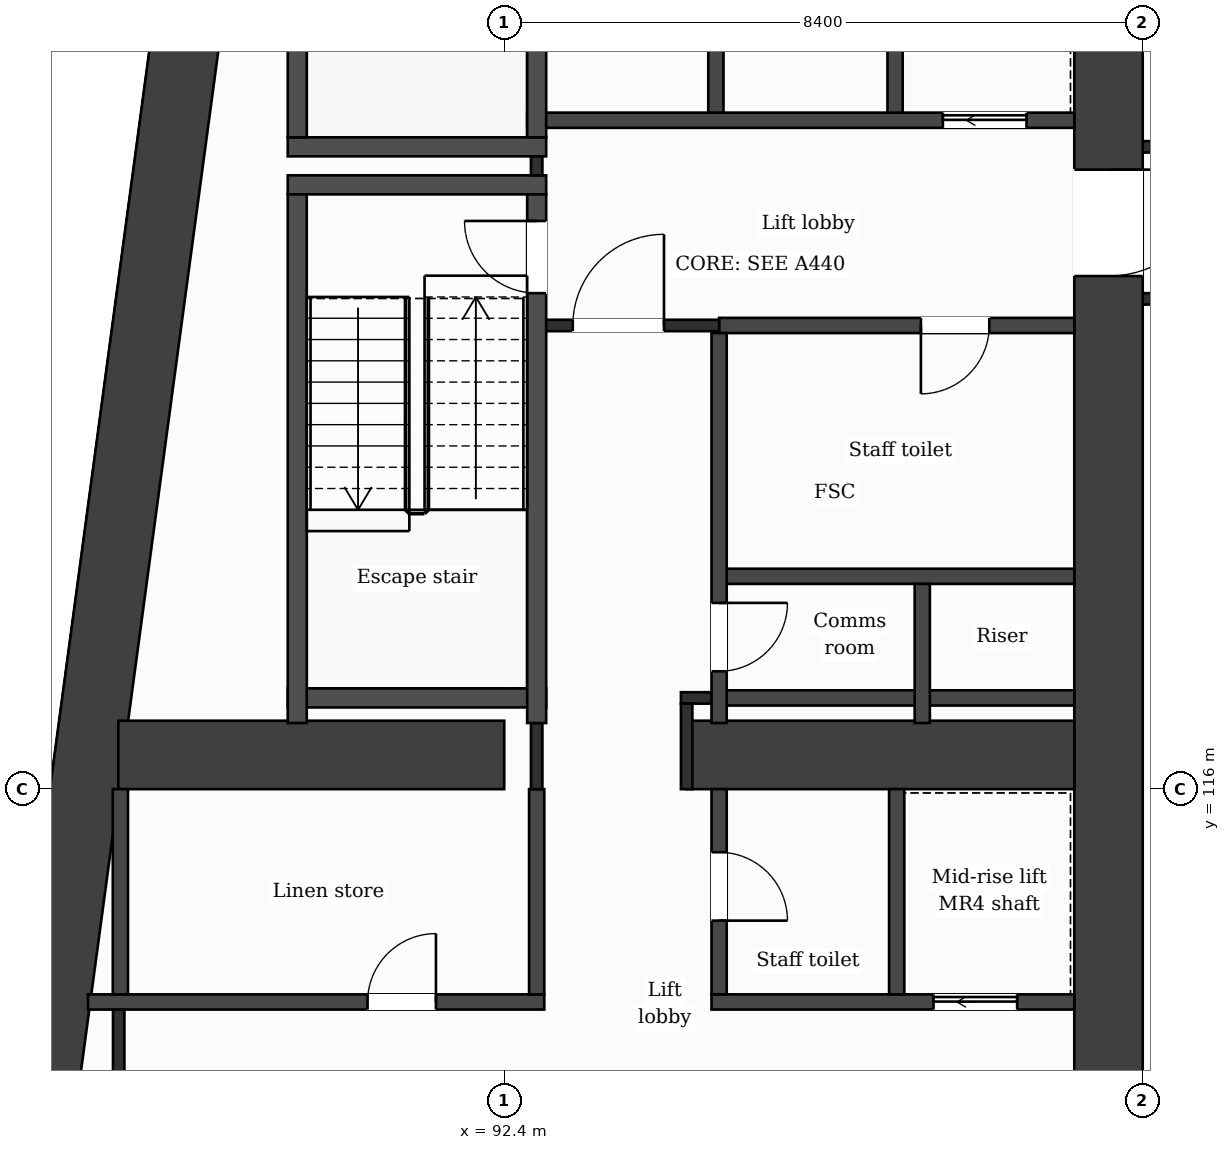
"""IFC4 building model, lengths in metres.
Left out: names, types, materials, properties, quantities, classifications, styles, units other than length and angle.
Written with IfcOpenShell. Run it as: python <this file> out.ifc"""

import sys

from ifc_helpers import new_model, si_unit, direction, frame, frame_2d, origin, place, context, subcontext, project, spatial, rectangle, extrude, element, fill, save


model = new_model("IFC4")
c1 = context("Model", 3, precision=1e-05, world=origin(), true_north=direction((0.0, 1.0)))
c2 = subcontext(c1, "Body", "Model", "MODEL_VIEW")
j1 = project(units=[si_unit("LENGTHUNIT", "METRE"), si_unit("PLANEANGLEUNIT", "RADIAN")], contexts=[c1])
p1 = place(None, origin())
s1 = spatial("IfcSite", under=j1, at=p1, CompositionType="ELEMENT")
p2 = place(p1, origin())
s2 = spatial("IfcBuilding", under=s1, at=p2, CompositionType="ELEMENT")
p3 = place(p2, frame((0.0, 0.0, 166.3)))
s3 = spatial("IfcBuildingStorey", under=s2, at=p3, CompositionType="ELEMENT", Elevation=166.3)
p4 = place(p3, frame((100.35, 131.95, 0.0), z_axis=(0.0, 0.0, 1.0), x_axis=(0.0, -1.0, 0.0)))
e1 = element("IfcWall", 1, at=p4, inside=s3, PredefinedType="SHEAR", context=c2, shape_type="SweptSolid", body=[
    extrude(rectangle(XDim=21.1, YDim=0.9, at=frame_2d((10.55, 0.0))), origin(), (0.0, 0.0, 1.0), 3.7),
])
p5 = place(p4, frame((7.8, 0.0, 0.0)))
e2 = element("IfcOpeningElement", 2, at=p5, cuts=e1, PredefinedType="OPENING", context=c2, shape_type="SweptSolid", body=[
    extrude(rectangle(XDim=1.4, YDim=2.1, at=frame_2d((0.7, 1.05))), frame((0.0, 0.46, 0.0), z_axis=(0.0, -1.0, 0.0), x_axis=(1.0, 0.0, 0.0)), (0.0, 0.0, 1.0), 0.92),
])
p6 = place(p3, frame((86.184, 110.85, 0.0), z_axis=(0.0, 0.0, 1.0), x_axis=(0.133410495943, 0.991060865725, 0.0)))
e3 = element("IfcWall", 3, at=p6, inside=s3, PredefinedType="SHEAR", context=c2, shape_type="SweptSolid", body=[
    extrude(rectangle(XDim=21.29, YDim=0.9, at=frame_2d((10.645, 0.0))), origin(), (0.0, 0.0, 1.0), 3.7),
])
p7 = place(p3, frame((87.323, 116.45, 0.0), z_axis=(0.0, 0.0, 1.0), x_axis=(1.0, 0.0, 0.0)))
e4 = element("IfcWall", 4, at=p7, inside=s3, PredefinedType="SHEAR", context=c2, shape_type="SweptSolid", body=[
    extrude(rectangle(XDim=5.077, YDim=0.9, at=frame_2d((2.539, 0.0))), origin(), (0.0, 0.0, 1.0), 3.7),
])
p8 = place(p3, frame((94.8, 116.45, 0.0), z_axis=(0.0, 0.0, 1.0), x_axis=(1.0, 0.0, 0.0)))
e5 = element("IfcWall", 5, at=p8, inside=s3, PredefinedType="SHEAR", context=c2, shape_type="SweptSolid", body=[
    extrude(rectangle(XDim=5.1, YDim=0.9, at=frame_2d((2.55, 0.0))), origin(), (0.0, 0.0, 1.0), 3.7),
])
p9 = place(p3, frame((86.924, 113.2, 0.0), z_axis=(0.0, 0.0, 1.0), x_axis=(1.0, 0.0, 0.0)))
e6 = element("IfcWall", 6, at=p9, inside=s3, PredefinedType="PARTITIONING", context=c2, shape_type="SweptSolid", body=[
    extrude(rectangle(XDim=6.003, YDim=0.2, at=frame_2d((3.001, 0.0))), origin(), (0.0, 0.0, 1.0), 3.38),
])
p10 = place(p9, frame((3.678, 0.0, 0.0)))
e7 = element("IfcOpeningElement", 7, at=p10, cuts=e6, PredefinedType="OPENING", context=c2, shape_type="SweptSolid", body=[
    extrude(rectangle(XDim=0.9, YDim=2.1, at=frame_2d((0.45, 1.05))), frame((0.0, 0.11, 0.0), z_axis=(0.0, -1.0, 0.0), x_axis=(1.0, 0.0, 0.0)), (0.0, 0.0, 1.0), 0.22),
])
p11 = place(p3, frame((95.127, 113.2, 0.0), z_axis=(0.0, 0.0, 1.0), x_axis=(1.0, 0.0, 0.0)))
e8 = element("IfcWall", 8, at=p11, inside=s3, PredefinedType="PARTITIONING", context=c2, shape_type="SweptSolid", body=[
    extrude(rectangle(XDim=4.773, YDim=0.2, at=frame_2d((2.386, 0.0))), origin(), (0.0, 0.0, 1.0), 3.38),
])
p12 = place(p11, frame((2.921, 0.0, 0.0)))
e9 = element("IfcOpeningElement", 9, at=p12, cuts=e8, PredefinedType="OPENING", context=c2, shape_type="SweptSolid", body=[
    extrude(rectangle(XDim=1.1, YDim=2.1, at=frame_2d((0.55, 1.05))), frame((0.0, 0.11, 0.0), z_axis=(0.0, -1.0, 0.0), x_axis=(1.0, 0.0, 0.0)), (0.0, 0.0, 1.0), 0.22),
])
p13 = place(p3, frame((95.227, 117.2, 0.0), z_axis=(0.0, 0.0, 1.0), x_axis=(1.0, 0.0, 0.0)))
e10 = element("IfcWall", 10, at=p13, inside=s3, PredefinedType="PARTITIONING", context=c2, shape_type="SweptSolid", body=[
    extrude(rectangle(XDim=4.673, YDim=0.2, at=frame_2d((2.336, 0.0))), origin(), (0.0, 0.0, 1.0), 3.38),
])
p14 = place(p3, frame((94.725, 117.2, 0.0), z_axis=(0.0, 0.0, 1.0), x_axis=(1.0, 0.0, 0.0)))
e11 = element("IfcWall", 11, at=p14, inside=s3, PredefinedType="PARTITIONING", context=c2, shape_type="SweptSolid", body=[
    extrude(rectangle(XDim=0.502, YDim=0.15, at=frame_2d((0.251, 0.0))), origin(), (0.0, 0.0, 1.0), 3.38),
])
p15 = place(p3, frame((89.552, 117.2, 0.0), z_axis=(0.0, 0.0, 1.0), x_axis=(1.0, 0.0, 0.0)))
e12 = element("IfcWall", 12, at=p15, inside=s3, PredefinedType="PARTITIONING", context=c2, shape_type="SweptSolid", body=[
    extrude(rectangle(XDim=3.4, YDim=0.25, at=frame_2d((1.7, 0.0))), origin(), (0.0, 0.0, 1.0), 3.38),
])
p16 = place(p3, frame((95.227, 118.8, 0.0), z_axis=(0.0, 0.0, 1.0), x_axis=(1.0, 0.0, 0.0)))
e13 = element("IfcWall", 13, at=p16, inside=s3, PredefinedType="PARTITIONING", context=c2, shape_type="SweptSolid", body=[
    extrude(rectangle(XDim=4.673, YDim=0.2, at=frame_2d((2.336, 0.0))), origin(), (0.0, 0.0, 1.0), 3.38),
])
p17 = place(p3, frame((95.227, 122.1, 0.0), z_axis=(0.0, 0.0, 1.0), x_axis=(1.0, 0.0, 0.0)))
e14 = element("IfcWall", 14, at=p17, inside=s3, PredefinedType="PARTITIONING", context=c2, shape_type="SweptSolid", body=[
    extrude(rectangle(XDim=4.673, YDim=0.2, at=frame_2d((2.336, 0.0))), origin(), (0.0, 0.0, 1.0), 3.38),
])
p18 = place(p17, frame((2.655, 0.0, 0.0)))
e15 = element("IfcOpeningElement", 15, at=p18, cuts=e14, PredefinedType="OPENING", context=c2, shape_type="SweptSolid", body=[
    extrude(rectangle(XDim=0.9, YDim=2.1, at=frame_2d((0.45, 1.05))), frame((0.0, 0.11, 0.0), z_axis=(0.0, -1.0, 0.0), x_axis=(1.0, 0.0, 0.0)), (0.0, 0.0, 1.0), 0.22),
])
p19 = place(p3, frame((92.827, 122.1, 0.0), z_axis=(0.0, 0.0, 1.0), x_axis=(1.0, 0.0, 0.0)))
e16 = element("IfcWall", 16, at=p19, inside=s3, PredefinedType="PARTITIONING", context=c2, shape_type="SweptSolid", body=[
    extrude(rectangle(XDim=2.4, YDim=0.15, at=frame_2d((1.2, 0.0))), origin(), (0.0, 0.0, 1.0), 3.38),
])
p20 = place(p19, frame((0.475, 0.0, 0.0)))
e17 = element("IfcOpeningElement", 17, at=p20, cuts=e16, PredefinedType="OPENING", context=c2, shape_type="SweptSolid", body=[
    extrude(rectangle(XDim=1.2, YDim=2.1, at=frame_2d((0.6, 1.05))), frame((0.0, 0.085, 0.0), z_axis=(0.0, -1.0, 0.0), x_axis=(1.0, 0.0, 0.0)), (0.0, 0.0, 1.0), 0.17),
])
p21 = place(p3, frame((100.8, 122.45, 0.0), z_axis=(0.0, 0.0, 1.0), x_axis=(1.0, 0.0, 0.0)))
e18 = element("IfcWall", 18, at=p21, inside=s3, PredefinedType="PARTITIONING", context=c2, shape_type="SweptSolid", body=[
    extrude(rectangle(XDim=25.2, YDim=0.15, at=frame_2d((12.6, 0.0))), origin(), (0.0, 0.0, 1.0), 3.38),
])
for number, where, z_axis, x_axis in (
    (19, (89.552, 123.95, 0.0), (0.0, 0.0, 1.0), (1.0, 0.0, 0.0)),
    (20, (89.552, 124.45, 0.0), (0.0, 0.0, 1.0), (1.0, 0.0, 0.0)),
):
    element("IfcWall", number, at=place(p3, frame(where, z_axis=z_axis, x_axis=x_axis)), inside=s3, PredefinedType="PARTITIONING", context=c2, shape_type="SweptSolid", body=[
        extrude(rectangle(XDim=3.4, YDim=0.25, at=frame_2d((1.7, 0.0))), origin(), (0.0, 0.0, 1.0), 3.38),
    ])
p22 = place(p3, frame((100.8, 124.45, 0.0), z_axis=(0.0, 0.0, 1.0), x_axis=(1.0, 0.0, 0.0)))
e21 = element("IfcWall", 21, at=p22, inside=s3, PredefinedType="PARTITIONING", context=c2, shape_type="SweptSolid", body=[
    extrude(rectangle(XDim=25.2, YDim=0.15, at=frame_2d((12.6, 0.0))), origin(), (0.0, 0.0, 1.0), 3.38),
])
p23 = place(p22, frame((4.275, 0.0, 0.0)))
e22 = element("IfcOpeningElement", 22, at=p23, cuts=e21, PredefinedType="OPENING", context=c2, shape_type="SweptSolid", body=[
    extrude(rectangle(XDim=1.0, YDim=2.1, at=frame_2d((0.5, 1.05))), frame((0.0, 0.085, 0.0), z_axis=(0.0, -1.0, 0.0), x_axis=(1.0, 0.0, 0.0)), (0.0, 0.0, 1.0), 0.17),
])
p24 = place(p22, frame((0.675, 0.0, 0.0)))
e23 = element("IfcOpeningElement", 23, at=p24, cuts=e21, PredefinedType="OPENING", context=c2, shape_type="SweptSolid", body=[
    extrude(rectangle(XDim=1.0, YDim=2.1, at=frame_2d((0.5, 1.05))), frame((0.0, 0.085, 0.0), z_axis=(0.0, -1.0, 0.0), x_axis=(1.0, 0.0, 0.0)), (0.0, 0.0, 1.0), 0.17),
])
p25 = place(p22, frame((10.425, 0.0, 0.0)))
e24 = element("IfcOpeningElement", 24, at=p25, cuts=e21, PredefinedType="OPENING", context=c2, shape_type="SweptSolid", body=[
    extrude(rectangle(XDim=1.0, YDim=2.1, at=frame_2d((0.5, 1.05))), frame((0.0, 0.085, 0.0), z_axis=(0.0, -1.0, 0.0), x_axis=(1.0, 0.0, 0.0)), (0.0, 0.0, 1.0), 0.17),
])
p26 = place(p22, frame((22.175, 0.0, 0.0)))
e25 = element("IfcOpeningElement", 25, at=p26, cuts=e21, PredefinedType="OPENING", context=c2, shape_type="SweptSolid", body=[
    extrude(rectangle(XDim=1.0, YDim=2.1, at=frame_2d((0.5, 1.05))), frame((0.0, 0.085, 0.0), z_axis=(0.0, -1.0, 0.0), x_axis=(1.0, 0.0, 0.0)), (0.0, 0.0, 1.0), 0.17),
])
p27 = place(p3, frame((92.702, 124.8, 0.0), z_axis=(0.0, 0.0, 1.0), x_axis=(1.0, 0.0, 0.0)))
e26 = element("IfcWall", 26, at=p27, inside=s3, PredefinedType="PARTITIONING", context=c2, shape_type="SweptSolid", body=[
    extrude(rectangle(XDim=7.198, YDim=0.2, at=frame_2d((3.599, 0.0))), origin(), (0.0, 0.0, 1.0), 3.38),
])
p28 = place(p27, frame((5.469, 0.0, 0.0)))
e27 = element("IfcOpeningElement", 27, at=p28, cuts=e26, PredefinedType="OPENING", context=c2, shape_type="SweptSolid", body=[
    extrude(rectangle(XDim=1.1, YDim=2.1, at=frame_2d((0.55, 1.05))), frame((0.0, 0.11, 0.0), z_axis=(0.0, -1.0, 0.0), x_axis=(1.0, 0.0, 0.0)), (0.0, 0.0, 1.0), 0.22),
])
p29 = place(p3, frame((87.35, 113.3, 0.0), z_axis=(0.0, 0.0, 1.0), x_axis=(0.0, 1.0, 0.0)))
e28 = element("IfcWall", 28, at=p29, inside=s3, PredefinedType="PARTITIONING", context=c2, shape_type="SweptSolid", body=[
    extrude(rectangle(XDim=2.7, YDim=0.2, at=frame_2d((1.35, 0.0))), origin(), (0.0, 0.0, 1.0), 3.38),
])
p30 = place(p3, frame((87.328, 111.3, 0.0), z_axis=(0.0, 0.0, 1.0), x_axis=(0.0, 1.0, 0.0)))
e29 = element("IfcWall", 29, at=p30, inside=s3, PredefinedType="PARTITIONING", context=c2, shape_type="SweptSolid", body=[
    extrude(rectangle(XDim=1.8, YDim=0.15, at=frame_2d((0.9, 0.0))), origin(), (0.0, 0.0, 1.0), 3.38),
])
p31 = place(p3, frame((89.677, 116.87, 0.0), z_axis=(0.0, 0.0, 1.0), x_axis=(0.0, 1.0, 0.0)))
e30 = element("IfcWall", 30, at=p31, inside=s3, PredefinedType="PARTITIONING", context=c2, shape_type="SweptSolid", body=[
    extrude(rectangle(XDim=6.955, YDim=0.25, at=frame_2d((3.478, 0.0))), origin(), (0.0, 0.0, 1.0), 3.38),
])
p32 = place(p3, frame((89.677, 124.575, 0.0), z_axis=(0.0, 0.0, 1.0), x_axis=(0.0, 1.0, 0.0)))
e31 = element("IfcWall", 31, at=p32, inside=s3, PredefinedType="PARTITIONING", context=c2, shape_type="SweptSolid", body=[
    extrude(rectangle(XDim=6.955, YDim=0.25, at=frame_2d((3.478, 0.0))), origin(), (0.0, 0.0, 1.0), 3.38),
])
p33 = place(p3, frame((92.827, 113.3, 0.0), z_axis=(0.0, 0.0, 1.0), x_axis=(0.0, 1.0, 0.0)))
e32 = element("IfcWall", 32, at=p33, inside=s3, PredefinedType="PARTITIONING", context=c2, shape_type="SweptSolid", body=[
    extrude(rectangle(XDim=2.7, YDim=0.2, at=frame_2d((1.35, 0.0))), origin(), (0.0, 0.0, 1.0), 3.38),
])
p34 = place(p3, frame((92.827, 116.0, 0.0), z_axis=(0.0, 0.0, 1.0), x_axis=(0.0, 1.0, 0.0)))
e33 = element("IfcWall", 33, at=p34, inside=s3, PredefinedType="PARTITIONING", context=c2, shape_type="SweptSolid", body=[
    extrude(rectangle(XDim=0.87, YDim=0.15, at=frame_2d((0.435, 0.0))), origin(), (0.0, 0.0, 1.0), 3.38),
])
p35 = place(p3, frame((92.827, 124.075, 0.0), z_axis=(0.0, 0.0, 1.0), x_axis=(0.0, 1.0, 0.0)))
e34 = element("IfcWall", 34, at=p35, inside=s3, PredefinedType="PARTITIONING", context=c2, shape_type="SweptSolid", body=[
    extrude(rectangle(XDim=0.25, YDim=0.15, at=frame_2d((0.125, 0.0))), origin(), (0.0, 0.0, 1.0), 3.38),
])
p36 = place(p3, frame((92.827, 116.87, 0.0), z_axis=(0.0, 0.0, 1.0), x_axis=(0.0, 1.0, 0.0)))
e35 = element("IfcWall", 35, at=p36, inside=s3, PredefinedType="PARTITIONING", context=c2, shape_type="SweptSolid", body=[
    extrude(rectangle(XDim=6.955, YDim=0.25, at=frame_2d((3.478, 0.0))), origin(), (0.0, 0.0, 1.0), 3.38),
])
p37 = place(p36, frame((5.655, 0.0, 0.0)))
e36 = element("IfcOpeningElement", 36, at=p37, cuts=e35, PredefinedType="OPENING", context=c2, shape_type="SweptSolid", body=[
    extrude(rectangle(XDim=0.95, YDim=2.1, at=frame_2d((0.475, 1.05))), frame((0.0, 0.135, 0.0), z_axis=(0.0, -1.0, 0.0), x_axis=(1.0, 0.0, 0.0)), (0.0, 0.0, 1.0), 0.27),
])
p38 = place(p3, frame((92.827, 124.575, 0.0), z_axis=(0.0, 0.0, 1.0), x_axis=(0.0, 1.0, 0.0)))
e37 = element("IfcWall", 37, at=p38, inside=s3, PredefinedType="PARTITIONING", context=c2, shape_type="SweptSolid", body=[
    extrude(rectangle(XDim=6.955, YDim=0.25, at=frame_2d((3.478, 0.0))), origin(), (0.0, 0.0, 1.0), 3.38),
])
p39 = place(p38, frame((5.325, 0.0, 0.0)))
e38 = element("IfcOpeningElement", 38, at=p39, cuts=e37, PredefinedType="OPENING", context=c2, shape_type="SweptSolid", body=[
    extrude(rectangle(XDim=1.0, YDim=2.1, at=frame_2d((0.5, 1.05))), frame((0.0, 0.135, 0.0), z_axis=(0.0, -1.0, 0.0), x_axis=(1.0, 0.0, 0.0)), (0.0, 0.0, 1.0), 0.27),
])
p40 = place(p3, frame((94.8, 116.0, 0.0), z_axis=(0.0, 0.0, 1.0), x_axis=(0.0, 1.0, 0.0)))
e39 = element("IfcWall", 39, at=p40, inside=s3, PredefinedType="PARTITIONING", context=c2, shape_type="SweptSolid", body=[
    extrude(rectangle(XDim=1.125, YDim=0.15, at=frame_2d((0.562, 0.0))), origin(), (0.0, 0.0, 1.0), 3.38),
])
p41 = place(p3, frame((95.185, 124.9, 0.0), z_axis=(0.0, 0.0, 1.0), x_axis=(0.0, 1.0, 0.0)))
e40 = element("IfcWall", 40, at=p41, inside=s3, PredefinedType="PARTITIONING", context=c2, shape_type="SweptSolid", body=[
    extrude(rectangle(XDim=3.1, YDim=0.2, at=frame_2d((1.55, 0.0))), origin(), (0.0, 0.0, 1.0), 3.38),
])
p42 = place(p3, frame((95.227, 113.3, 0.0), z_axis=(0.0, 0.0, 1.0), x_axis=(0.0, 1.0, 0.0)))
e41 = element("IfcWall", 41, at=p42, inside=s3, PredefinedType="PARTITIONING", context=c2, shape_type="SweptSolid", body=[
    extrude(rectangle(XDim=2.7, YDim=0.2, at=frame_2d((1.35, 0.0))), origin(), (0.0, 0.0, 1.0), 3.38),
])
p43 = place(p42, frame((0.97, 0.0, 0.0)))
e42 = element("IfcOpeningElement", 42, at=p43, cuts=e41, PredefinedType="OPENING", context=c2, shape_type="SweptSolid", body=[
    extrude(rectangle(XDim=0.9, YDim=2.1, at=frame_2d((0.45, 1.05))), frame((0.0, 0.11, 0.0), z_axis=(0.0, -1.0, 0.0), x_axis=(1.0, 0.0, 0.0)), (0.0, 0.0, 1.0), 0.22),
])
p44 = place(p3, frame((95.227, 116.87, 0.0), z_axis=(0.0, 0.0, 1.0), x_axis=(0.0, 1.0, 0.0)))
e43 = element("IfcWall", 43, at=p44, inside=s3, PredefinedType="PARTITIONING", context=c2, shape_type="SweptSolid", body=[
    extrude(rectangle(XDim=5.13, YDim=0.2, at=frame_2d((2.565, 0.0))), origin(), (0.0, 0.0, 1.0), 3.38),
])
p45 = place(p44, frame((0.68, 0.0, 0.0)))
e44 = element("IfcOpeningElement", 44, at=p45, cuts=e43, PredefinedType="OPENING", context=c2, shape_type="SweptSolid", body=[
    extrude(rectangle(XDim=0.9, YDim=2.1, at=frame_2d((0.45, 1.05))), frame((0.0, 0.11, 0.0), z_axis=(0.0, -1.0, 0.0), x_axis=(1.0, 0.0, 0.0)), (0.0, 0.0, 1.0), 0.22),
])
p46 = place(p3, frame((97.542, 124.9, 0.0), z_axis=(0.0, 0.0, 1.0), x_axis=(0.0, 1.0, 0.0)))
e45 = element("IfcWall", 45, at=p46, inside=s3, PredefinedType="PARTITIONING", context=c2, shape_type="SweptSolid", body=[
    extrude(rectangle(XDim=3.1, YDim=0.2, at=frame_2d((1.55, 0.0))), origin(), (0.0, 0.0, 1.0), 3.38),
])
p47 = place(p3, frame((97.563, 113.3, 0.0), z_axis=(0.0, 0.0, 1.0), x_axis=(0.0, 1.0, 0.0)))
e46 = element("IfcWall", 46, at=p47, inside=s3, PredefinedType="PARTITIONING", context=c2, shape_type="SweptSolid", body=[
    extrude(rectangle(XDim=2.7, YDim=0.2, at=frame_2d((1.35, 0.0))), origin(), (0.0, 0.0, 1.0), 3.38),
])
p48 = place(p3, frame((97.9, 116.87, 0.0), z_axis=(0.0, 0.0, 1.0), x_axis=(0.0, 1.0, 0.0)))
e47 = element("IfcWall", 47, at=p48, inside=s3, PredefinedType="PARTITIONING", context=c2, shape_type="SweptSolid", body=[
    extrude(rectangle(XDim=1.83, YDim=0.2, at=frame_2d((0.915, 0.0))), origin(), (0.0, 0.0, 1.0), 3.38),
])
p49 = place(p20, origin())
e48 = element("IfcDoor", 48, at=p49, inside=s3, OperationType="SINGLE_SWING_RIGHT", PredefinedType="DOOR", context=c2, shape_type="SweptSolid", body=[
    extrude(rectangle(XDim=1.2, YDim=2.1, at=frame_2d((0.6, 1.05))), frame((0.0, 0.025, 0.0), z_axis=(0.0, -1.0, 0.0), x_axis=(1.0, 0.0, 0.0)), (0.0, 0.0, 1.0), 0.05),
])
fill(e17, e48)
p50 = place(p28, origin())
e49 = element("IfcDoor", 49, at=p50, inside=s3, OperationType="SLIDING_TO_LEFT", PredefinedType="DOOR", context=c2, shape_type="SweptSolid", body=[
    extrude(rectangle(XDim=1.1, YDim=2.1, at=frame_2d((0.55, 1.05))), frame((0.0, 0.025, 0.0), z_axis=(0.0, -1.0, 0.0), x_axis=(1.0, 0.0, 0.0)), (0.0, 0.0, 1.0), 0.05),
])
fill(e27, e49)
p51 = place(p18, origin())
e50 = element("IfcDoor", 50, at=p51, inside=s3, OperationType="SINGLE_SWING_LEFT", PredefinedType="DOOR", context=c2, shape_type="SweptSolid", body=[
    extrude(rectangle(XDim=0.9, YDim=2.1, at=frame_2d((0.45, 1.05))), frame((0.0, 0.025, 0.0), z_axis=(0.0, -1.0, 0.0), x_axis=(1.0, 0.0, 0.0)), (0.0, 0.0, 1.0), 0.05),
])
fill(e15, e50)
p52 = place(p37, origin())
e51 = element("IfcDoor", 51, at=p52, inside=s3, OperationType="SINGLE_SWING_RIGHT", PredefinedType="DOOR", context=c2, shape_type="SweptSolid", body=[
    extrude(rectangle(XDim=0.95, YDim=2.1, at=frame_2d((0.475, 1.05))), frame((0.0, 0.025, 0.0), z_axis=(0.0, -1.0, 0.0), x_axis=(1.0, 0.0, 0.0)), (0.0, 0.0, 1.0), 0.05),
])
fill(e36, e51)
p53 = place(p45, origin())
e52 = element("IfcDoor", 52, at=p53, inside=s3, OperationType="SINGLE_SWING_RIGHT", PredefinedType="DOOR", context=c2, shape_type="SweptSolid", body=[
    extrude(rectangle(XDim=0.9, YDim=2.1, at=frame_2d((0.45, 1.05))), frame((0.0, 0.025, 0.0), z_axis=(0.0, -1.0, 0.0), x_axis=(1.0, 0.0, 0.0)), (0.0, 0.0, 1.0), 0.05),
])
fill(e44, e52)
p54 = place(p12, origin())
e53 = element("IfcDoor", 53, at=p54, inside=s3, OperationType="SLIDING_TO_LEFT", PredefinedType="DOOR", context=c2, shape_type="SweptSolid", body=[
    extrude(rectangle(XDim=1.1, YDim=2.1, at=frame_2d((0.55, 1.05))), frame((0.0, 0.025, 0.0), z_axis=(0.0, -1.0, 0.0), x_axis=(1.0, 0.0, 0.0)), (0.0, 0.0, 1.0), 0.05),
])
fill(e9, e53)
p55 = place(p10, origin())
e54 = element("IfcDoor", 54, at=p55, inside=s3, OperationType="SINGLE_SWING_RIGHT", PredefinedType="DOOR", context=c2, shape_type="SweptSolid", body=[
    extrude(rectangle(XDim=0.9, YDim=2.1, at=frame_2d((0.45, 1.05))), frame((0.0, 0.025, 0.0), z_axis=(0.0, -1.0, 0.0), x_axis=(1.0, 0.0, 0.0)), (0.0, 0.0, 1.0), 0.05),
])
fill(e7, e54)
p56 = place(p43, origin())
e55 = element("IfcDoor", 55, at=p56, inside=s3, OperationType="SINGLE_SWING_LEFT", PredefinedType="DOOR", context=c2, shape_type="SweptSolid", body=[
    extrude(rectangle(XDim=0.9, YDim=2.1, at=frame_2d((0.45, 1.05))), frame((0.0, 0.025, 0.0), z_axis=(0.0, -1.0, 0.0), x_axis=(1.0, 0.0, 0.0)), (0.0, 0.0, 1.0), 0.05),
])
fill(e42, e55)
p57 = place(p5, origin())
e56 = element("IfcDoor", 56, at=p57, inside=s3, OperationType="SINGLE_SWING_LEFT", PredefinedType="DOOR", context=c2, shape_type="SweptSolid", body=[
    extrude(rectangle(XDim=1.4, YDim=2.1, at=frame_2d((0.7, 1.05))), frame((0.0, 0.025, 0.0), z_axis=(0.0, -1.0, 0.0), x_axis=(1.0, 0.0, 0.0)), (0.0, 0.0, 1.0), 0.05),
])
fill(e2, e56)
save(model, sys.argv[1])
